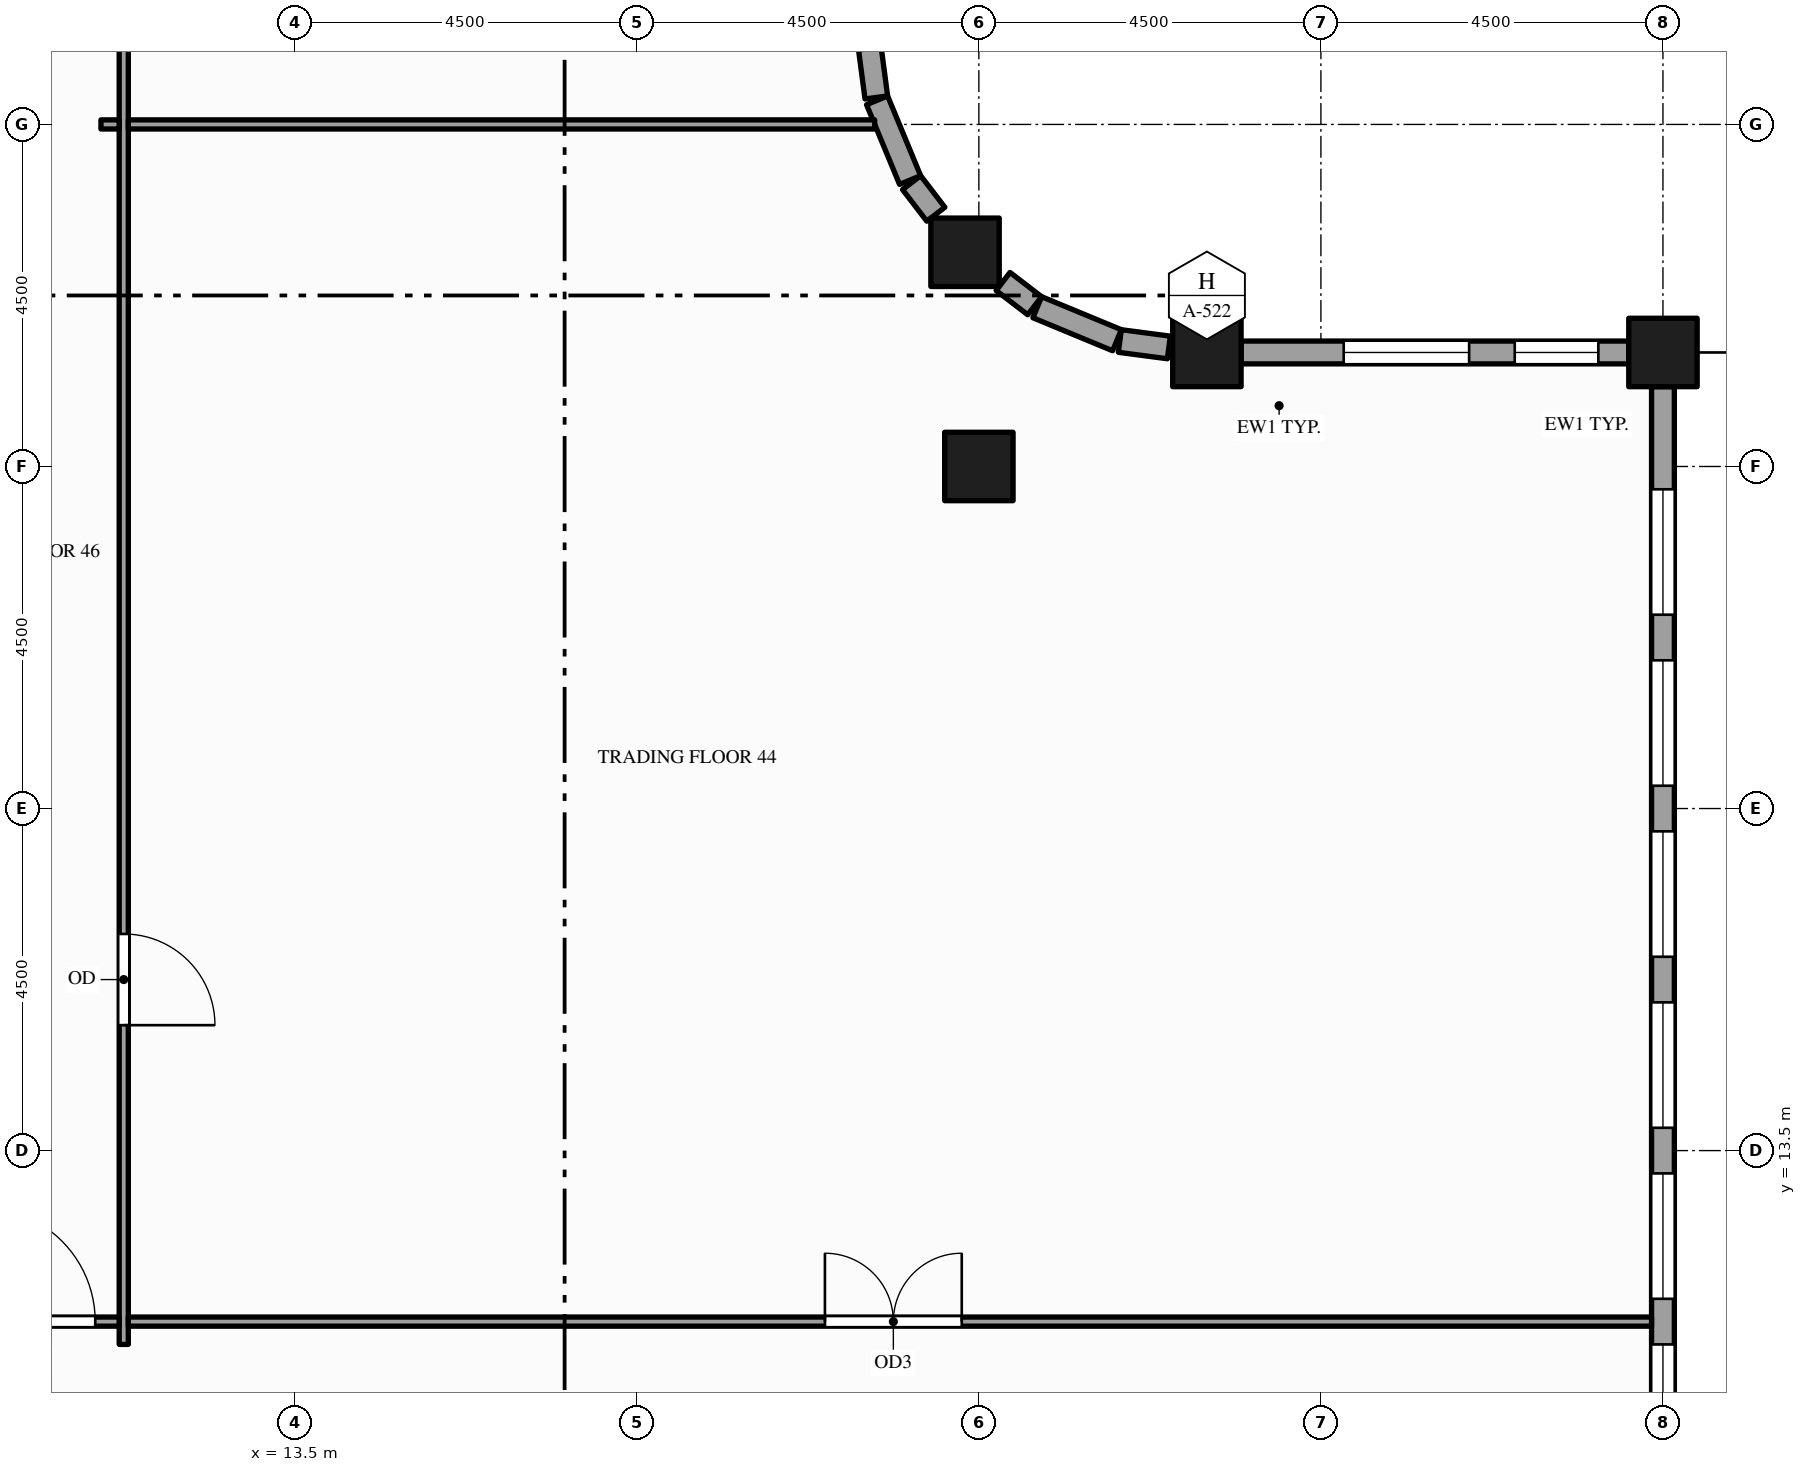
"""IFC4 building model, lengths in metres.
Left out: names, types, materials, properties, quantities, classifications, styles, units other than length and angle.
Written with IfcOpenShell. Run it as: python <this file> out.ifc"""

import sys

from ifc_helpers import new_model, si_unit, direction, frame, frame_2d, origin, origin_2d, place, context, subcontext, project, spatial, rectangle, hollow_rectangle, extrude, element, fill, save


model = new_model("IFC4")
c1 = context("Model", 3, precision=1e-05, world=origin(), true_north=direction((0.0, 1.0)))
c2 = subcontext(c1, "Body", "Model", "MODEL_VIEW")
j1 = project(units=[si_unit("LENGTHUNIT", "METRE"), si_unit("PLANEANGLEUNIT", "RADIAN")], contexts=[c1])
p1 = place(None, origin())
s1 = spatial("IfcSite", under=j1, at=p1, CompositionType="ELEMENT")
p2 = place(p1, origin())
s2 = spatial("IfcBuilding", under=s1, at=p2, CompositionType="ELEMENT")
p3 = place(p2, frame((0.0, 0.0, 147.0)))
s3 = spatial("IfcBuildingStorey", under=s2, at=p3, CompositionType="ELEMENT", Elevation=147.0)
for number, where, z_axis, x_axis in (
    (1, (22.318, 25.318, -0.15), (0.0, 0.0, 1.0), (1.0, 0.0, 0.0)),
    (2, (22.5, 22.5, -0.15), (0.0, 0.0, 1.0), (1.0, 0.0, 0.0)),
    (3, (25.5, 24.0, -0.15), (0.0, 0.0, 1.0), (1.0, 0.0, 0.0)),
    (4, (31.5, 24.0, -0.15), (0.0, 0.0, 1.0), (1.0, 0.0, 0.0)),
):
    element("IfcColumn", number, at=place(p3, frame(where, z_axis=z_axis, x_axis=x_axis)), inside=s3, PredefinedType="COLUMN", context=c2, shape_type="SweptSolid", body=[
        extrude(hollow_rectangle(XDim=0.9, YDim=0.9, WallThickness=0.045, at=origin_2d()), origin(), (0.0, 0.0, 1.0), 4.0),
    ])
p4 = place(p3, frame((31.05, 24.0, 0.0), z_axis=(0.0, 0.0, 1.0), x_axis=(-1.0, 0.0, 0.0)))
e5 = element("IfcWall", 5, at=p4, inside=s3, PredefinedType="STANDARD", context=c2, shape_type="SweptSolid", body=[
    extrude(rectangle(XDim=5.1, YDim=0.3, at=frame_2d((2.55, 0.0))), origin(), (0.0, 0.0, 1.0), 2.87),
])
p5 = place(p4, frame((0.4, 0.0, 0.9)))
e6 = element("IfcOpeningElement", 6, at=p5, cuts=e5, PredefinedType="OPENING", context=c2, shape_type="SweptSolid", body=[
    extrude(rectangle(XDim=1.1, YDim=1.75, at=frame_2d((0.55, 0.875))), frame((0.0, 0.16, 0.0), z_axis=(0.0, -1.0, 0.0), x_axis=(1.0, 0.0, 0.0)), (0.0, 0.0, 1.0), 0.32),
])
p6 = place(p4, frame((2.1, 0.0, 0.9)))
e7 = element("IfcOpeningElement", 7, at=p6, cuts=e5, PredefinedType="OPENING", context=c2, shape_type="SweptSolid", body=[
    extrude(rectangle(XDim=1.65, YDim=1.75, at=frame_2d((0.825, 0.875))), frame((0.0, 0.16, 0.0), z_axis=(0.0, -1.0, 0.0), x_axis=(1.0, 0.0, 0.0)), (0.0, 0.0, 1.0), 0.32),
])
p7 = place(p3, frame((25.0, 24.066, 0.0), z_axis=(0.0, 0.0, 1.0), x_axis=(-0.991423590996, 0.130687655177, 0.0)))
e8 = element("IfcWall", 8, at=p7, inside=s3, PredefinedType="STANDARD", context=c2, shape_type="SweptSolid", body=[
    extrude(rectangle(XDim=0.65, YDim=0.3, at=frame_2d((0.325, 0.0))), origin(), (0.0, 0.0, 1.0), 2.87),
])
p8 = place(p3, frame((24.317, 24.161, 0.0), z_axis=(0.0, 0.0, 1.0), x_axis=(-0.923914616768, 0.382598720491, 0.0)))
e9 = element("IfcWall", 9, at=p8, inside=s3, PredefinedType="STANDARD", context=c2, shape_type="SweptSolid", body=[
    extrude(rectangle(XDim=1.135, YDim=0.3, at=frame_2d((0.568, 0.0))), origin(), (0.0, 0.0, 1.0), 3.149),
])
for number, where, z_axis, x_axis in (
    (10, (23.234, 24.615, 0.0), (0.0, 0.0, 1.0), (-0.794, 0.609, 0.0)),
    (11, (21.934, 25.819, 0.0), (0.0, 0.0, 1.0), (-0.609, 0.794, 0.0)),
):
    element("IfcWall", number, at=place(p3, frame(where, z_axis=z_axis, x_axis=x_axis)), inside=s3, PredefinedType="STANDARD", context=c2, shape_type="SweptSolid", body=[
        extrude(rectangle(XDim=0.524, YDim=0.3, at=frame_2d((0.262, 0.0))), origin(), (0.0, 0.0, 1.0), 3.149),
    ])
p9 = place(p3, frame((21.595, 26.268, 0.0), z_axis=(0.0, 0.0, 1.0), x_axis=(-0.382598720491, 0.923914616768, 0.0)))
e12 = element("IfcWall", 12, at=p9, inside=s3, PredefinedType="STANDARD", context=c2, shape_type="SweptSolid", body=[
    extrude(rectangle(XDim=1.135, YDim=0.3, at=frame_2d((0.568, 0.0))), origin(), (0.0, 0.0, 1.0), 3.149),
])
p10 = place(p3, frame((21.151, 27.355, 0.0), z_axis=(0.0, 0.0, 1.0), x_axis=(-0.130687655177, 0.991423590996, 0.0)))
e13 = element("IfcWall", 13, at=p10, inside=s3, PredefinedType="STANDARD", context=c2, shape_type="SweptSolid", body=[
    extrude(rectangle(XDim=0.65, YDim=0.3, at=frame_2d((0.325, 0.0))), origin(), (0.0, 0.0, 1.0), 3.149),
])
p11 = place(p3, frame((31.5, 1.95, 0.0), z_axis=(0.0, 0.0, 1.0), x_axis=(0.0, 1.0, 0.0)))
e14 = element("IfcWall", 14, at=p11, inside=s3, PredefinedType="STANDARD", context=c2, shape_type="SweptSolid", body=[
    extrude(rectangle(XDim=21.6, YDim=0.3, at=frame_2d((10.8, 0.0))), origin(), (0.0, 0.0, 1.0), 2.87),
])
p12 = place(p11, frame((0.6, 0.0, 0.9)))
e15 = element("IfcOpeningElement", 15, at=p12, cuts=e14, PredefinedType="OPENING", context=c2, shape_type="SweptSolid", body=[
    extrude(rectangle(XDim=1.65, YDim=1.75, at=frame_2d((0.825, 0.875))), frame((0.0, 0.16, 0.0), z_axis=(0.0, -1.0, 0.0), x_axis=(1.0, 0.0, 0.0)), (0.0, 0.0, 1.0), 0.32),
])
p13 = place(p11, frame((2.85, 0.0, 0.9)))
e16 = element("IfcOpeningElement", 16, at=p13, cuts=e14, PredefinedType="OPENING", context=c2, shape_type="SweptSolid", body=[
    extrude(rectangle(XDim=1.65, YDim=1.75, at=frame_2d((0.825, 0.875))), frame((0.0, 0.16, 0.0), z_axis=(0.0, -1.0, 0.0), x_axis=(1.0, 0.0, 0.0)), (0.0, 0.0, 1.0), 0.32),
])
p14 = place(p11, frame((5.1, 0.0, 0.9)))
e17 = element("IfcOpeningElement", 17, at=p14, cuts=e14, PredefinedType="OPENING", context=c2, shape_type="SweptSolid", body=[
    extrude(rectangle(XDim=1.65, YDim=1.75, at=frame_2d((0.825, 0.875))), frame((0.0, 0.16, 0.0), z_axis=(0.0, -1.0, 0.0), x_axis=(1.0, 0.0, 0.0)), (0.0, 0.0, 1.0), 0.32),
])
p15 = place(p11, frame((7.35, 0.0, 0.9)))
e18 = element("IfcOpeningElement", 18, at=p15, cuts=e14, PredefinedType="OPENING", context=c2, shape_type="SweptSolid", body=[
    extrude(rectangle(XDim=1.65, YDim=1.75, at=frame_2d((0.825, 0.875))), frame((0.0, 0.16, 0.0), z_axis=(0.0, -1.0, 0.0), x_axis=(1.0, 0.0, 0.0)), (0.0, 0.0, 1.0), 0.32),
])
p16 = place(p11, frame((9.6, 0.0, 0.9)))
e19 = element("IfcOpeningElement", 19, at=p16, cuts=e14, PredefinedType="OPENING", context=c2, shape_type="SweptSolid", body=[
    extrude(rectangle(XDim=1.65, YDim=1.75, at=frame_2d((0.825, 0.875))), frame((0.0, 0.16, 0.0), z_axis=(0.0, -1.0, 0.0), x_axis=(1.0, 0.0, 0.0)), (0.0, 0.0, 1.0), 0.32),
])
p17 = place(p11, frame((11.85, 0.0, 0.9)))
e20 = element("IfcOpeningElement", 20, at=p17, cuts=e14, PredefinedType="OPENING", context=c2, shape_type="SweptSolid", body=[
    extrude(rectangle(XDim=1.65, YDim=1.75, at=frame_2d((0.825, 0.875))), frame((0.0, 0.16, 0.0), z_axis=(0.0, -1.0, 0.0), x_axis=(1.0, 0.0, 0.0)), (0.0, 0.0, 1.0), 0.32),
])
p18 = place(p11, frame((14.1, 0.0, 0.9)))
e21 = element("IfcOpeningElement", 21, at=p18, cuts=e14, PredefinedType="OPENING", context=c2, shape_type="SweptSolid", body=[
    extrude(rectangle(XDim=1.65, YDim=1.75, at=frame_2d((0.825, 0.875))), frame((0.0, 0.16, 0.0), z_axis=(0.0, -1.0, 0.0), x_axis=(1.0, 0.0, 0.0)), (0.0, 0.0, 1.0), 0.32),
])
p19 = place(p11, frame((16.35, 0.0, 0.9)))
e22 = element("IfcOpeningElement", 22, at=p19, cuts=e14, PredefinedType="OPENING", context=c2, shape_type="SweptSolid", body=[
    extrude(rectangle(XDim=1.65, YDim=1.75, at=frame_2d((0.825, 0.875))), frame((0.0, 0.16, 0.0), z_axis=(0.0, -1.0, 0.0), x_axis=(1.0, 0.0, 0.0)), (0.0, 0.0, 1.0), 0.32),
])
p20 = place(p11, frame((18.6, 0.0, 0.9)))
e23 = element("IfcOpeningElement", 23, at=p20, cuts=e14, PredefinedType="OPENING", context=c2, shape_type="SweptSolid", body=[
    extrude(rectangle(XDim=1.65, YDim=1.75, at=frame_2d((0.825, 0.875))), frame((0.0, 0.16, 0.0), z_axis=(0.0, -1.0, 0.0), x_axis=(1.0, 0.0, 0.0)), (0.0, 0.0, 1.0), 0.32),
])
p21 = place(p3, frame((11.25, 10.95, 0.0), z_axis=(0.0, 0.0, 1.0), x_axis=(0.0, 1.0, 0.0)))
e24 = element("IfcWall", 24, at=p21, inside=s3, PredefinedType="PARTITIONING", context=c2, shape_type="SweptSolid", body=[
    extrude(rectangle(XDim=20.85, YDim=0.12, at=frame_2d((10.425, 0.0))), origin(), (0.0, 0.0, 1.0), 2.6),
])
p22 = place(p21, frame((17.8, 0.0, 0.0)))
e25 = element("IfcOpeningElement", 25, at=p22, cuts=e24, PredefinedType="OPENING", context=c2, shape_type="SweptSolid", body=[
    extrude(rectangle(XDim=1.0, YDim=2.1, at=frame_2d((0.5, 1.05))), frame((0.0, 0.07, 0.0), z_axis=(0.0, -1.0, 0.0), x_axis=(1.0, 0.0, 0.0)), (0.0, 0.0, 1.0), 0.14),
])
p23 = place(p21, frame((4.2, 0.0, 0.0)))
e26 = element("IfcOpeningElement", 26, at=p23, cuts=e24, PredefinedType="OPENING", context=c2, shape_type="SweptSolid", body=[
    extrude(rectangle(XDim=1.2, YDim=2.1, at=frame_2d((0.6, 1.05))), frame((0.0, 0.07, 0.0), z_axis=(0.0, -1.0, 0.0), x_axis=(1.0, 0.0, 0.0)), (0.0, 0.0, 1.0), 0.14),
])
p24 = place(p3, frame((9.06, 11.25, 0.0), z_axis=(0.0, 0.0, 1.0), x_axis=(1.0, 0.0, 0.0)))
e27 = element("IfcWall", 27, at=p24, inside=s3, PredefinedType="PARTITIONING", context=c2, shape_type="SweptSolid", body=[
    extrude(rectangle(XDim=2.13, YDim=0.12, at=frame_2d((1.065, 0.0))), origin(), (0.0, 0.0, 1.0), 2.87),
])
p25 = place(p24, frame((0.315, 0.0, 0.0)))
e28 = element("IfcOpeningElement", 28, at=p25, cuts=e27, PredefinedType="OPENING", context=c2, shape_type="SweptSolid", body=[
    extrude(rectangle(XDim=1.5, YDim=2.1, at=frame_2d((0.75, 1.05))), frame((0.0, 0.07, 0.0), z_axis=(0.0, -1.0, 0.0), x_axis=(1.0, 0.0, 0.0)), (0.0, 0.0, 1.0), 0.14),
])
p26 = place(p3, frame((11.31, 11.25, 0.0), z_axis=(0.0, 0.0, 1.0), x_axis=(1.0, 0.0, 0.0)))
e29 = element("IfcWall", 29, at=p26, inside=s3, PredefinedType="PARTITIONING", context=c2, shape_type="SweptSolid", body=[
    extrude(rectangle(XDim=20.04, YDim=0.12, at=frame_2d((10.02, 0.0))), origin(), (0.0, 0.0, 1.0), 2.87),
])
p27 = place(p26, frame((9.165, 0.0, 0.0)))
e30 = element("IfcOpeningElement", 30, at=p27, cuts=e29, PredefinedType="OPENING", context=c2, shape_type="SweptSolid", body=[
    extrude(rectangle(XDim=1.8, YDim=2.1, at=frame_2d((0.9, 1.05))), frame((0.0, 0.07, 0.0), z_axis=(0.0, -1.0, 0.0), x_axis=(1.0, 0.0, 0.0)), (0.0, 0.0, 1.0), 0.14),
])
p28 = place(p3, frame((10.95, 27.0, 0.0), z_axis=(0.0, 0.0, 1.0), x_axis=(1.0, 0.0, 0.0)))
e31 = element("IfcWall", 31, at=p28, inside=s3, PredefinedType="PARTITIONING", context=c2, shape_type="SweptSolid", body=[
    extrude(rectangle(XDim=0.24, YDim=0.12, at=frame_2d((0.12, 0.0))), origin(), (0.0, 0.0, 1.0), 2.87),
])
p29 = place(p3, frame((11.31, 27.0, 0.0), z_axis=(0.0, 0.0, 1.0), x_axis=(1.0, 0.0, 0.0)))
e32 = element("IfcWall", 32, at=p29, inside=s3, PredefinedType="PARTITIONING", context=c2, shape_type="SweptSolid", body=[
    extrude(rectangle(XDim=9.82, YDim=0.12, at=frame_2d((4.91, 0.0))), origin(), (0.0, 0.0, 1.0), 2.87),
])
p30 = place(p5, origin())
e33 = element("IfcWindow", 33, at=p30, inside=s3, PartitioningType="SINGLE_PANEL", PredefinedType="WINDOW", context=c2, shape_type="SweptSolid", body=[
    extrude(rectangle(XDim=1.1, YDim=1.75, at=frame_2d((0.55, 0.875))), frame((0.0, 0.03, 0.0), z_axis=(0.0, -1.0, 0.0), x_axis=(1.0, 0.0, 0.0)), (0.0, 0.0, 1.0), 0.06),
])
fill(e6, e33)
p31 = place(p6, origin())
e34 = element("IfcWindow", 34, at=p31, inside=s3, PartitioningType="SINGLE_PANEL", PredefinedType="WINDOW", context=c2, shape_type="SweptSolid", body=[
    extrude(rectangle(XDim=1.65, YDim=1.75, at=frame_2d((0.825, 0.875))), frame((0.0, 0.03, 0.0), z_axis=(0.0, -1.0, 0.0), x_axis=(1.0, 0.0, 0.0)), (0.0, 0.0, 1.0), 0.06),
])
fill(e7, e34)
p32 = place(p15, origin())
e35 = element("IfcWindow", 35, at=p32, inside=s3, PartitioningType="SINGLE_PANEL", PredefinedType="WINDOW", context=c2, shape_type="SweptSolid", body=[
    extrude(rectangle(XDim=1.65, YDim=1.75, at=frame_2d((0.825, 0.875))), frame((0.0, 0.03, 0.0), z_axis=(0.0, -1.0, 0.0), x_axis=(1.0, 0.0, 0.0)), (0.0, 0.0, 1.0), 0.06),
])
fill(e18, e35)
p33 = place(p16, origin())
e36 = element("IfcWindow", 36, at=p33, inside=s3, PartitioningType="SINGLE_PANEL", PredefinedType="WINDOW", context=c2, shape_type="SweptSolid", body=[
    extrude(rectangle(XDim=1.65, YDim=1.75, at=frame_2d((0.825, 0.875))), frame((0.0, 0.03, 0.0), z_axis=(0.0, -1.0, 0.0), x_axis=(1.0, 0.0, 0.0)), (0.0, 0.0, 1.0), 0.06),
])
fill(e19, e36)
p34 = place(p17, origin())
e37 = element("IfcWindow", 37, at=p34, inside=s3, PartitioningType="SINGLE_PANEL", PredefinedType="WINDOW", context=c2, shape_type="SweptSolid", body=[
    extrude(rectangle(XDim=1.65, YDim=1.75, at=frame_2d((0.825, 0.875))), frame((0.0, 0.03, 0.0), z_axis=(0.0, -1.0, 0.0), x_axis=(1.0, 0.0, 0.0)), (0.0, 0.0, 1.0), 0.06),
])
fill(e20, e37)
p35 = place(p18, origin())
e38 = element("IfcWindow", 38, at=p35, inside=s3, PartitioningType="SINGLE_PANEL", PredefinedType="WINDOW", context=c2, shape_type="SweptSolid", body=[
    extrude(rectangle(XDim=1.65, YDim=1.75, at=frame_2d((0.825, 0.875))), frame((0.0, 0.03, 0.0), z_axis=(0.0, -1.0, 0.0), x_axis=(1.0, 0.0, 0.0)), (0.0, 0.0, 1.0), 0.06),
])
fill(e21, e38)
p36 = place(p19, origin())
e39 = element("IfcWindow", 39, at=p36, inside=s3, PartitioningType="SINGLE_PANEL", PredefinedType="WINDOW", context=c2, shape_type="SweptSolid", body=[
    extrude(rectangle(XDim=1.65, YDim=1.75, at=frame_2d((0.825, 0.875))), frame((0.0, 0.03, 0.0), z_axis=(0.0, -1.0, 0.0), x_axis=(1.0, 0.0, 0.0)), (0.0, 0.0, 1.0), 0.06),
])
fill(e22, e39)
p37 = place(p20, origin())
e40 = element("IfcWindow", 40, at=p37, inside=s3, PartitioningType="SINGLE_PANEL", PredefinedType="WINDOW", context=c2, shape_type="SweptSolid", body=[
    extrude(rectangle(XDim=1.65, YDim=1.75, at=frame_2d((0.825, 0.875))), frame((0.0, 0.03, 0.0), z_axis=(0.0, -1.0, 0.0), x_axis=(1.0, 0.0, 0.0)), (0.0, 0.0, 1.0), 0.06),
])
fill(e23, e40)
p38 = place(p27, origin())
e41 = element("IfcDoor", 41, at=p38, inside=s3, OperationType="DOUBLE_DOOR_SINGLE_SWING", PredefinedType="DOOR", context=c2, shape_type="SweptSolid", body=[
    extrude(rectangle(XDim=1.8, YDim=2.1, at=frame_2d((0.9, 1.05))), frame((0.0, 0.025, 0.0), z_axis=(0.0, -1.0, 0.0), x_axis=(1.0, 0.0, 0.0)), (0.0, 0.0, 1.0), 0.05),
])
fill(e30, e41)
p39 = place(p25, origin())
e42 = element("IfcDoor", 42, at=p39, inside=s3, OperationType="SINGLE_SWING_LEFT", PredefinedType="DOOR", context=c2, shape_type="SweptSolid", body=[
    extrude(rectangle(XDim=1.5, YDim=2.1, at=frame_2d((0.75, 1.05))), frame((0.0, 0.025, 0.0), z_axis=(0.0, -1.0, 0.0), x_axis=(1.0, 0.0, 0.0)), (0.0, 0.0, 1.0), 0.05),
])
fill(e28, e42)
p40 = place(p23, origin())
e43 = element("IfcDoor", 43, at=p40, inside=s3, OperationType="SINGLE_SWING_LEFT", PredefinedType="DOOR", context=c2, shape_type="SweptSolid", body=[
    extrude(rectangle(XDim=1.2, YDim=2.1, at=frame_2d((0.6, 1.05))), frame((0.0, 0.025, 0.0), z_axis=(0.0, -1.0, 0.0), x_axis=(1.0, 0.0, 0.0)), (0.0, 0.0, 1.0), 0.05),
])
fill(e26, e43)
save(model, sys.argv[1])
